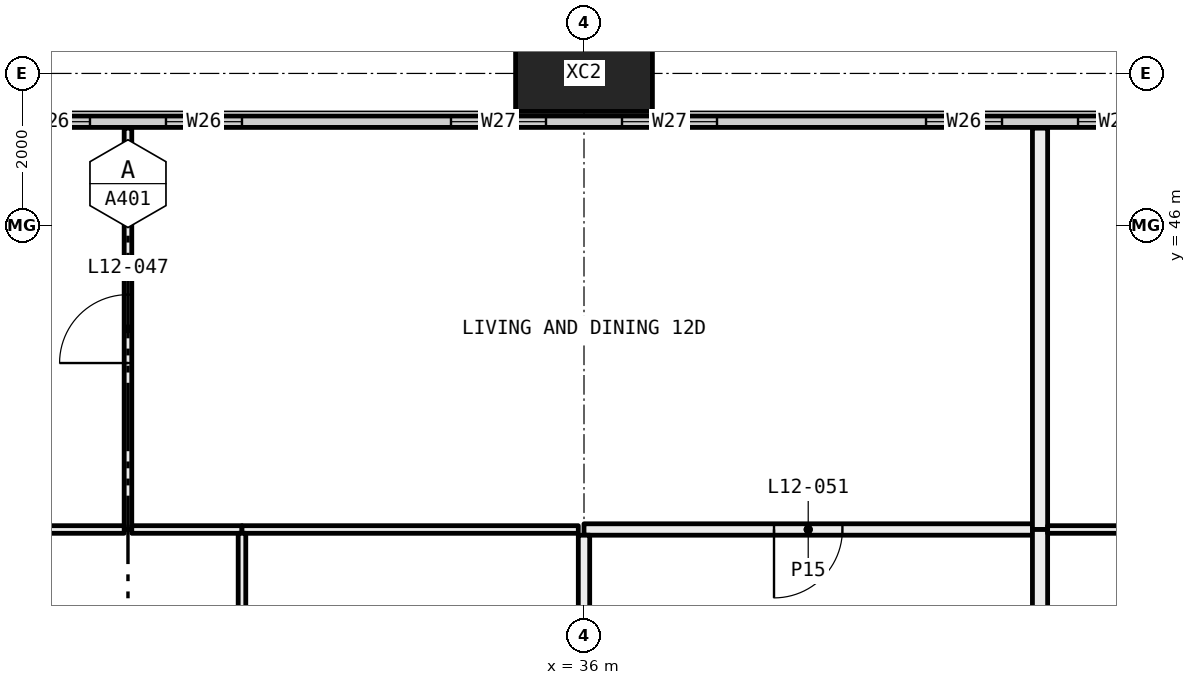
"""IFC4 building model, lengths in metres.
Left out: names, types, materials, properties, quantities, classifications, styles, units other than length and angle.
Written with IfcOpenShell. Run it as: python <this file> out.ifc"""

import sys

from ifc_helpers import new_model, si_unit, direction, frame, frame_2d, origin, origin_2d, place, context, subcontext, project, spatial, rectangle, hollow_rectangle, extrude, element, fill, save


model = new_model("IFC4")
c1 = context("Model", 3, precision=1e-05, world=origin(), true_north=direction((0.0, 1.0)))
c2 = subcontext(c1, "Body", "Model", "MODEL_VIEW")
j1 = project(units=[si_unit("LENGTHUNIT", "METRE"), si_unit("PLANEANGLEUNIT", "RADIAN")], contexts=[c1])
p1 = place(None, origin())
s1 = spatial("IfcSite", under=j1, at=p1, CompositionType="ELEMENT")
p2 = place(p1, origin())
s2 = spatial("IfcBuilding", under=s1, at=p2, CompositionType="ELEMENT")
p3 = place(p2, frame((0.0, 0.0, 54.15)))
s3 = spatial("IfcBuildingStorey", under=s2, at=p3, CompositionType="ELEMENT", Elevation=54.15)
p4 = place(p3, frame((36.0, 48.0, -0.4), z_axis=(0.0, 0.0, 1.0), x_axis=(1.0, 0.0, 0.0)))
e1 = element("IfcColumn", 1, at=p4, inside=s3, PredefinedType="COLUMN", context=c2, shape_type="SweptSolid", body=[
    extrude(hollow_rectangle(XDim=1.8, YDim=1.0, WallThickness=0.07, at=origin_2d()), origin(), (0.0, 0.0, 1.0), 3.45),
])
p5 = place(p3, frame((6.56, 47.365, 0.0), z_axis=(0.0, 0.0, 1.0), x_axis=(1.0, 0.0, 0.0)))
e2 = element("IfcWall", 2, at=p5, inside=s3, PredefinedType="ELEMENTEDWALL", context=c2, shape_type="SweptSolid", body=[
    extrude(rectangle(XDim=58.88, YDim=0.15, at=frame_2d((29.44, 0.0))), origin(), (0.0, 0.0, 1.0), 3.05),
])
p6 = place(p5, frame((0.44, 0.0, 0.45)))
e3 = element("IfcOpeningElement", 3, at=p6, cuts=e2, PredefinedType="OPENING", context=c2, shape_type="SweptSolid", body=[
    extrude(rectangle(XDim=4.5, YDim=2.55, at=frame_2d((2.25, 1.275))), frame((0.0, 0.085, 0.0), z_axis=(0.0, -1.0, 0.0), x_axis=(1.0, 0.0, 0.0)), (0.0, 0.0, 1.0), 0.17),
])
p7 = place(p5, frame((5.94, 0.0, 0.45)))
e4 = element("IfcOpeningElement", 4, at=p7, cuts=e2, PredefinedType="OPENING", context=c2, shape_type="SweptSolid", body=[
    extrude(rectangle(XDim=1.25, YDim=2.55, at=frame_2d((0.625, 1.275))), frame((0.0, 0.085, 0.0), z_axis=(0.0, -1.0, 0.0), x_axis=(1.0, 0.0, 0.0)), (0.0, 0.0, 1.0), 0.17),
])
p8 = place(p5, frame((9.94, 0.0, 0.45)))
e5 = element("IfcOpeningElement", 5, at=p8, cuts=e2, PredefinedType="OPENING", context=c2, shape_type="SweptSolid", body=[
    extrude(rectangle(XDim=1.0, YDim=2.55, at=frame_2d((0.5, 1.275))), frame((0.0, 0.085, 0.0), z_axis=(0.0, -1.0, 0.0), x_axis=(1.0, 0.0, 0.0)), (0.0, 0.0, 1.0), 0.17),
])
p9 = place(p5, frame((11.94, 0.0, 0.45)))
e6 = element("IfcOpeningElement", 6, at=p9, cuts=e2, PredefinedType="OPENING", context=c2, shape_type="SweptSolid", body=[
    extrude(rectangle(XDim=1.0, YDim=2.55, at=frame_2d((0.5, 1.275))), frame((0.0, 0.085, 0.0), z_axis=(0.0, -1.0, 0.0), x_axis=(1.0, 0.0, 0.0)), (0.0, 0.0, 1.0), 0.17),
])
p10 = place(p5, frame((15.69, 0.0, 0.45)))
e7 = element("IfcOpeningElement", 7, at=p10, cuts=e2, PredefinedType="OPENING", context=c2, shape_type="SweptSolid", body=[
    extrude(rectangle(XDim=1.25, YDim=2.55, at=frame_2d((0.625, 1.275))), frame((0.0, 0.085, 0.0), z_axis=(0.0, -1.0, 0.0), x_axis=(1.0, 0.0, 0.0)), (0.0, 0.0, 1.0), 0.17),
])
p11 = place(p5, frame((17.94, 0.0, 0.45)))
e8 = element("IfcOpeningElement", 8, at=p11, cuts=e2, PredefinedType="OPENING", context=c2, shape_type="SweptSolid", body=[
    extrude(rectangle(XDim=1.25, YDim=2.55, at=frame_2d((0.625, 1.275))), frame((0.0, 0.085, 0.0), z_axis=(0.0, -1.0, 0.0), x_axis=(1.0, 0.0, 0.0)), (0.0, 0.0, 1.0), 0.17),
])
p12 = place(p5, frame((21.94, 0.0, 0.45)))
e9 = element("IfcOpeningElement", 9, at=p12, cuts=e2, PredefinedType="OPENING", context=c2, shape_type="SweptSolid", body=[
    extrude(rectangle(XDim=1.0, YDim=2.55, at=frame_2d((0.5, 1.275))), frame((0.0, 0.085, 0.0), z_axis=(0.0, -1.0, 0.0), x_axis=(1.0, 0.0, 0.0)), (0.0, 0.0, 1.0), 0.17),
])
p13 = place(p5, frame((23.94, 0.0, 0.45)))
e10 = element("IfcOpeningElement", 10, at=p13, cuts=e2, PredefinedType="OPENING", context=c2, shape_type="SweptSolid", body=[
    extrude(rectangle(XDim=1.0, YDim=2.55, at=frame_2d((0.5, 1.275))), frame((0.0, 0.085, 0.0), z_axis=(0.0, -1.0, 0.0), x_axis=(1.0, 0.0, 0.0)), (0.0, 0.0, 1.0), 0.17),
])
p14 = place(p5, frame((27.69, 0.0, 0.45)))
e11 = element("IfcOpeningElement", 11, at=p14, cuts=e2, PredefinedType="OPENING", context=c2, shape_type="SweptSolid", body=[
    extrude(rectangle(XDim=1.25, YDim=2.55, at=frame_2d((0.625, 1.275))), frame((0.0, 0.085, 0.0), z_axis=(0.0, -1.0, 0.0), x_axis=(1.0, 0.0, 0.0)), (0.0, 0.0, 1.0), 0.17),
])
p15 = place(p5, frame((29.94, 0.0, 0.45)))
e12 = element("IfcOpeningElement", 12, at=p15, cuts=e2, PredefinedType="OPENING", context=c2, shape_type="SweptSolid", body=[
    extrude(rectangle(XDim=1.25, YDim=2.55, at=frame_2d((0.625, 1.275))), frame((0.0, 0.085, 0.0), z_axis=(0.0, -1.0, 0.0), x_axis=(1.0, 0.0, 0.0)), (0.0, 0.0, 1.0), 0.17),
])
p16 = place(p5, frame((33.94, 0.0, 0.45)))
e13 = element("IfcOpeningElement", 13, at=p16, cuts=e2, PredefinedType="OPENING", context=c2, shape_type="SweptSolid", body=[
    extrude(rectangle(XDim=1.0, YDim=2.55, at=frame_2d((0.5, 1.275))), frame((0.0, 0.085, 0.0), z_axis=(0.0, -1.0, 0.0), x_axis=(1.0, 0.0, 0.0)), (0.0, 0.0, 1.0), 0.17),
])
p17 = place(p5, frame((35.94, 0.0, 0.45)))
e14 = element("IfcOpeningElement", 14, at=p17, cuts=e2, PredefinedType="OPENING", context=c2, shape_type="SweptSolid", body=[
    extrude(rectangle(XDim=1.0, YDim=2.55, at=frame_2d((0.5, 1.275))), frame((0.0, 0.085, 0.0), z_axis=(0.0, -1.0, 0.0), x_axis=(1.0, 0.0, 0.0)), (0.0, 0.0, 1.0), 0.17),
])
p18 = place(p5, frame((39.69, 0.0, 0.45)))
e15 = element("IfcOpeningElement", 15, at=p18, cuts=e2, PredefinedType="OPENING", context=c2, shape_type="SweptSolid", body=[
    extrude(rectangle(XDim=1.25, YDim=2.55, at=frame_2d((0.625, 1.275))), frame((0.0, 0.085, 0.0), z_axis=(0.0, -1.0, 0.0), x_axis=(1.0, 0.0, 0.0)), (0.0, 0.0, 1.0), 0.17),
])
p19 = place(p5, frame((41.94, 0.0, 0.45)))
e16 = element("IfcOpeningElement", 16, at=p19, cuts=e2, PredefinedType="OPENING", context=c2, shape_type="SweptSolid", body=[
    extrude(rectangle(XDim=1.25, YDim=2.55, at=frame_2d((0.625, 1.275))), frame((0.0, 0.085, 0.0), z_axis=(0.0, -1.0, 0.0), x_axis=(1.0, 0.0, 0.0)), (0.0, 0.0, 1.0), 0.17),
])
p20 = place(p5, frame((45.94, 0.0, 0.45)))
e17 = element("IfcOpeningElement", 17, at=p20, cuts=e2, PredefinedType="OPENING", context=c2, shape_type="SweptSolid", body=[
    extrude(rectangle(XDim=1.0, YDim=2.55, at=frame_2d((0.5, 1.275))), frame((0.0, 0.085, 0.0), z_axis=(0.0, -1.0, 0.0), x_axis=(1.0, 0.0, 0.0)), (0.0, 0.0, 1.0), 0.17),
])
p21 = place(p5, frame((47.94, 0.0, 0.45)))
e18 = element("IfcOpeningElement", 18, at=p21, cuts=e2, PredefinedType="OPENING", context=c2, shape_type="SweptSolid", body=[
    extrude(rectangle(XDim=1.0, YDim=2.55, at=frame_2d((0.5, 1.275))), frame((0.0, 0.085, 0.0), z_axis=(0.0, -1.0, 0.0), x_axis=(1.0, 0.0, 0.0)), (0.0, 0.0, 1.0), 0.17),
])
p22 = place(p5, frame((51.69, 0.0, 0.45)))
e19 = element("IfcOpeningElement", 19, at=p22, cuts=e2, PredefinedType="OPENING", context=c2, shape_type="SweptSolid", body=[
    extrude(rectangle(XDim=1.25, YDim=2.55, at=frame_2d((0.625, 1.275))), frame((0.0, 0.085, 0.0), z_axis=(0.0, -1.0, 0.0), x_axis=(1.0, 0.0, 0.0)), (0.0, 0.0, 1.0), 0.17),
])
p23 = place(p5, frame((53.94, 0.0, 0.45)))
e20 = element("IfcOpeningElement", 20, at=p23, cuts=e2, PredefinedType="OPENING", context=c2, shape_type="SweptSolid", body=[
    extrude(rectangle(XDim=4.5, YDim=2.55, at=frame_2d((2.25, 1.275))), frame((0.0, 0.085, 0.0), z_axis=(0.0, -1.0, 0.0), x_axis=(1.0, 0.0, 0.0)), (0.0, 0.0, 1.0), 0.17),
])
p24 = place(p3, frame((30.0, 42.0, 0.0), z_axis=(0.0, 0.0, 1.0), x_axis=(0.0, 1.0, 0.0)))
e21 = element("IfcWall", 21, at=p24, inside=s3, PredefinedType="PARTITIONING", context=c2, shape_type="SweptSolid", body=[
    extrude(rectangle(XDim=5.28, YDim=0.1, at=frame_2d((2.64, 0.0))), origin(), (0.0, 0.0, 1.0), 3.05),
])
p25 = place(p24, frame((2.19, 0.0, 0.0)))
e22 = element("IfcOpeningElement", 22, at=p25, cuts=e21, PredefinedType="OPENING", context=c2, shape_type="SweptSolid", body=[
    extrude(rectangle(XDim=0.9, YDim=2.1, at=frame_2d((0.45, 1.05))), frame((0.0, 0.06, 0.0), z_axis=(0.0, -1.0, 0.0), x_axis=(1.0, 0.0, 0.0)), (0.0, 0.0, 1.0), 0.12),
])
p26 = place(p3, frame((26.0, 42.0, 0.0), z_axis=(0.0, 0.0, 1.0), x_axis=(1.0, 0.0, 0.0)))
e23 = element("IfcWall", 23, at=p26, inside=s3, PredefinedType="PARTITIONING", context=c2, shape_type="SweptSolid", body=[
    extrude(rectangle(XDim=3.95, YDim=0.1, at=frame_2d((1.975, 0.0))), origin(), (0.0, 0.0, 1.0), 3.05),
])
p27 = place(p26, frame((1.525, 0.0, 0.0)))
e24 = element("IfcOpeningElement", 24, at=p27, cuts=e23, PredefinedType="OPENING", context=c2, shape_type="SweptSolid", body=[
    extrude(rectangle(XDim=0.9, YDim=2.1, at=frame_2d((0.45, 1.05))), frame((0.0, 0.06, 0.0), z_axis=(0.0, -1.0, 0.0), x_axis=(1.0, 0.0, 0.0)), (0.0, 0.0, 1.0), 0.12),
])
p28 = place(p3, frame((30.05, 42.0, 0.0), z_axis=(0.0, 0.0, 1.0), x_axis=(1.0, 0.0, 0.0)))
e25 = element("IfcWall", 25, at=p28, inside=s3, PredefinedType="PARTITIONING", context=c2, shape_type="SweptSolid", body=[
    extrude(rectangle(XDim=1.45, YDim=0.1, at=frame_2d((0.725, 0.0))), origin(), (0.0, 0.0, 1.0), 3.05),
])
p29 = place(p3, frame((31.5, 42.0, 0.0), z_axis=(0.0, 0.0, 1.0), x_axis=(1.0, 0.0, 0.0)))
e26 = element("IfcWall", 26, at=p29, inside=s3, PredefinedType="PARTITIONING", context=c2, shape_type="SweptSolid", body=[
    extrude(rectangle(XDim=4.425, YDim=0.1, at=frame_2d((2.212, 0.0))), origin(), (0.0, 0.0, 1.0), 2.45),
])
p30 = place(p3, frame((36.0, 42.0, 0.0), z_axis=(0.0, 0.0, 1.0), x_axis=(1.0, 0.0, 0.0)))
e27 = element("IfcWall", 27, at=p30, inside=s3, PredefinedType="PARTITIONING", context=c2, shape_type="SweptSolid", body=[
    extrude(rectangle(XDim=5.9, YDim=0.15, at=frame_2d((2.95, 0.0))), origin(), (0.0, 0.0, 1.0), 2.45),
])
p31 = place(p30, frame((2.5, 0.0, 0.0)))
e28 = element("IfcOpeningElement", 28, at=p31, cuts=e27, PredefinedType="OPENING", context=c2, shape_type="SweptSolid", body=[
    extrude(rectangle(XDim=0.9, YDim=2.1, at=frame_2d((0.45, 1.05))), frame((0.0, 0.085, 0.0), z_axis=(0.0, -1.0, 0.0), x_axis=(1.0, 0.0, 0.0)), (0.0, 0.0, 1.0), 0.17),
])
p32 = place(p3, frame((42.0, 42.0, 0.0), z_axis=(0.0, 0.0, 1.0), x_axis=(0.0, 1.0, 0.0)))
e29 = element("IfcWall", 29, at=p32, inside=s3, PredefinedType="PARTITIONING", context=c2, shape_type="SweptSolid", body=[
    extrude(rectangle(XDim=5.28, YDim=0.2, at=frame_2d((2.64, 0.0))), origin(), (0.0, 0.0, 1.0), 3.05),
])
p33 = place(p3, frame((31.5, 36.1, 0.0), z_axis=(0.0, 0.0, 1.0), x_axis=(0.0, 1.0, 0.0)))
e30 = element("IfcWall", 30, at=p33, inside=s3, PredefinedType="PARTITIONING", context=c2, shape_type="SweptSolid", body=[
    extrude(rectangle(XDim=5.85, YDim=0.1, at=frame_2d((2.925, 0.0))), origin(), (0.0, 0.0, 1.0), 3.05),
])
p34 = place(p33, frame((2.475, 0.0, 0.0)))
e31 = element("IfcOpeningElement", 31, at=p34, cuts=e30, PredefinedType="OPENING", context=c2, shape_type="SweptSolid", body=[
    extrude(rectangle(XDim=0.9, YDim=2.1, at=frame_2d((0.45, 1.05))), frame((0.0, 0.06, 0.0), z_axis=(0.0, -1.0, 0.0), x_axis=(1.0, 0.0, 0.0)), (0.0, 0.0, 1.0), 0.12),
])
p35 = place(p3, frame((36.0, 38.1, 0.0), z_axis=(0.0, 0.0, 1.0), x_axis=(0.0, 1.0, 0.0)))
e32 = element("IfcWall", 32, at=p35, inside=s3, PredefinedType="PARTITIONING", context=c2, shape_type="SweptSolid", body=[
    extrude(rectangle(XDim=3.825, YDim=0.15, at=frame_2d((1.913, 0.0))), origin(), (0.0, 0.0, 1.0), 2.45),
])
p36 = place(p3, frame((42.0, 38.1, 0.0), z_axis=(0.0, 0.0, 1.0), x_axis=(0.0, 1.0, 0.0)))
e33 = element("IfcWall", 33, at=p36, inside=s3, PredefinedType="PARTITIONING", context=c2, shape_type="SweptSolid", body=[
    extrude(rectangle(XDim=3.9, YDim=0.2, at=frame_2d((1.95, 0.0))), origin(), (0.0, 0.0, 1.0), 3.05),
])
p37 = place(p3, frame((42.1, 42.0, 0.0), z_axis=(0.0, 0.0, 1.0), x_axis=(1.0, 0.0, 0.0)))
e34 = element("IfcWall", 34, at=p37, inside=s3, PredefinedType="PARTITIONING", context=c2, shape_type="SweptSolid", body=[
    extrude(rectangle(XDim=3.9, YDim=0.1, at=frame_2d((1.95, 0.0))), origin(), (0.0, 0.0, 1.0), 3.05),
])
p38 = place(p37, frame((1.5, 0.0, 0.0)))
e35 = element("IfcOpeningElement", 35, at=p38, cuts=e34, PredefinedType="OPENING", context=c2, shape_type="SweptSolid", body=[
    extrude(rectangle(XDim=0.9, YDim=2.1, at=frame_2d((0.45, 1.05))), frame((0.0, 0.06, 0.0), z_axis=(0.0, -1.0, 0.0), x_axis=(1.0, 0.0, 0.0)), (0.0, 0.0, 1.0), 0.12),
])
p39 = place(p12, origin())
e36 = element("IfcWindow", 36, at=p39, inside=s3, PartitioningType="SINGLE_PANEL", PredefinedType="WINDOW", context=c2, shape_type="SweptSolid", body=[
    extrude(rectangle(XDim=1.0, YDim=2.55, at=frame_2d((0.5, 1.275))), frame((0.0, 0.03, 0.0), z_axis=(0.0, -1.0, 0.0), x_axis=(1.0, 0.0, 0.0)), (0.0, 0.0, 1.0), 0.06),
])
fill(e9, e36)
p40 = place(p13, origin())
e37 = element("IfcWindow", 37, at=p40, inside=s3, PartitioningType="SINGLE_PANEL", PredefinedType="WINDOW", context=c2, shape_type="SweptSolid", body=[
    extrude(rectangle(XDim=1.0, YDim=2.55, at=frame_2d((0.5, 1.275))), frame((0.0, 0.03, 0.0), z_axis=(0.0, -1.0, 0.0), x_axis=(1.0, 0.0, 0.0)), (0.0, 0.0, 1.0), 0.06),
])
fill(e10, e37)
p41 = place(p14, origin())
e38 = element("IfcWindow", 38, at=p41, inside=s3, PartitioningType="SINGLE_PANEL", PredefinedType="WINDOW", context=c2, shape_type="SweptSolid", body=[
    extrude(rectangle(XDim=1.25, YDim=2.55, at=frame_2d((0.625, 1.275))), frame((0.0, 0.03, 0.0), z_axis=(0.0, -1.0, 0.0), x_axis=(1.0, 0.0, 0.0)), (0.0, 0.0, 1.0), 0.06),
])
fill(e11, e38)
p42 = place(p15, origin())
e39 = element("IfcWindow", 39, at=p42, inside=s3, PartitioningType="SINGLE_PANEL", PredefinedType="WINDOW", context=c2, shape_type="SweptSolid", body=[
    extrude(rectangle(XDim=1.25, YDim=2.55, at=frame_2d((0.625, 1.275))), frame((0.0, 0.03, 0.0), z_axis=(0.0, -1.0, 0.0), x_axis=(1.0, 0.0, 0.0)), (0.0, 0.0, 1.0), 0.06),
])
fill(e12, e39)
p43 = place(p16, origin())
e40 = element("IfcWindow", 40, at=p43, inside=s3, PartitioningType="SINGLE_PANEL", PredefinedType="WINDOW", context=c2, shape_type="SweptSolid", body=[
    extrude(rectangle(XDim=1.0, YDim=2.55, at=frame_2d((0.5, 1.275))), frame((0.0, 0.03, 0.0), z_axis=(0.0, -1.0, 0.0), x_axis=(1.0, 0.0, 0.0)), (0.0, 0.0, 1.0), 0.06),
])
fill(e13, e40)
p44 = place(p17, origin())
e41 = element("IfcWindow", 41, at=p44, inside=s3, PartitioningType="SINGLE_PANEL", PredefinedType="WINDOW", context=c2, shape_type="SweptSolid", body=[
    extrude(rectangle(XDim=1.0, YDim=2.55, at=frame_2d((0.5, 1.275))), frame((0.0, 0.03, 0.0), z_axis=(0.0, -1.0, 0.0), x_axis=(1.0, 0.0, 0.0)), (0.0, 0.0, 1.0), 0.06),
])
fill(e14, e41)
p45 = place(p25, origin())
e42 = element("IfcDoor", 42, at=p45, inside=s3, OperationType="SINGLE_SWING_RIGHT", PredefinedType="DOOR", context=c2, shape_type="SweptSolid", body=[
    extrude(rectangle(XDim=0.9, YDim=2.1, at=frame_2d((0.45, 1.05))), frame((0.0, 0.025, 0.0), z_axis=(0.0, -1.0, 0.0), x_axis=(1.0, 0.0, 0.0)), (0.0, 0.0, 1.0), 0.05),
])
fill(e22, e42)
p46 = place(p31, frame((0.9, 0.0, 0.0), x_axis=(-1.0, 0.0, 0.0)))
e43 = element("IfcDoor", 43, at=p46, inside=s3, OperationType="SINGLE_SWING_LEFT", PredefinedType="DOOR", context=c2, shape_type="SweptSolid", body=[
    extrude(rectangle(XDim=0.9, YDim=2.1, at=frame_2d((0.45, 1.05))), frame((0.0, 0.025, 0.0), z_axis=(0.0, -1.0, 0.0), x_axis=(1.0, 0.0, 0.0)), (0.0, 0.0, 1.0), 0.05),
])
fill(e28, e43)
save(model, sys.argv[1])
